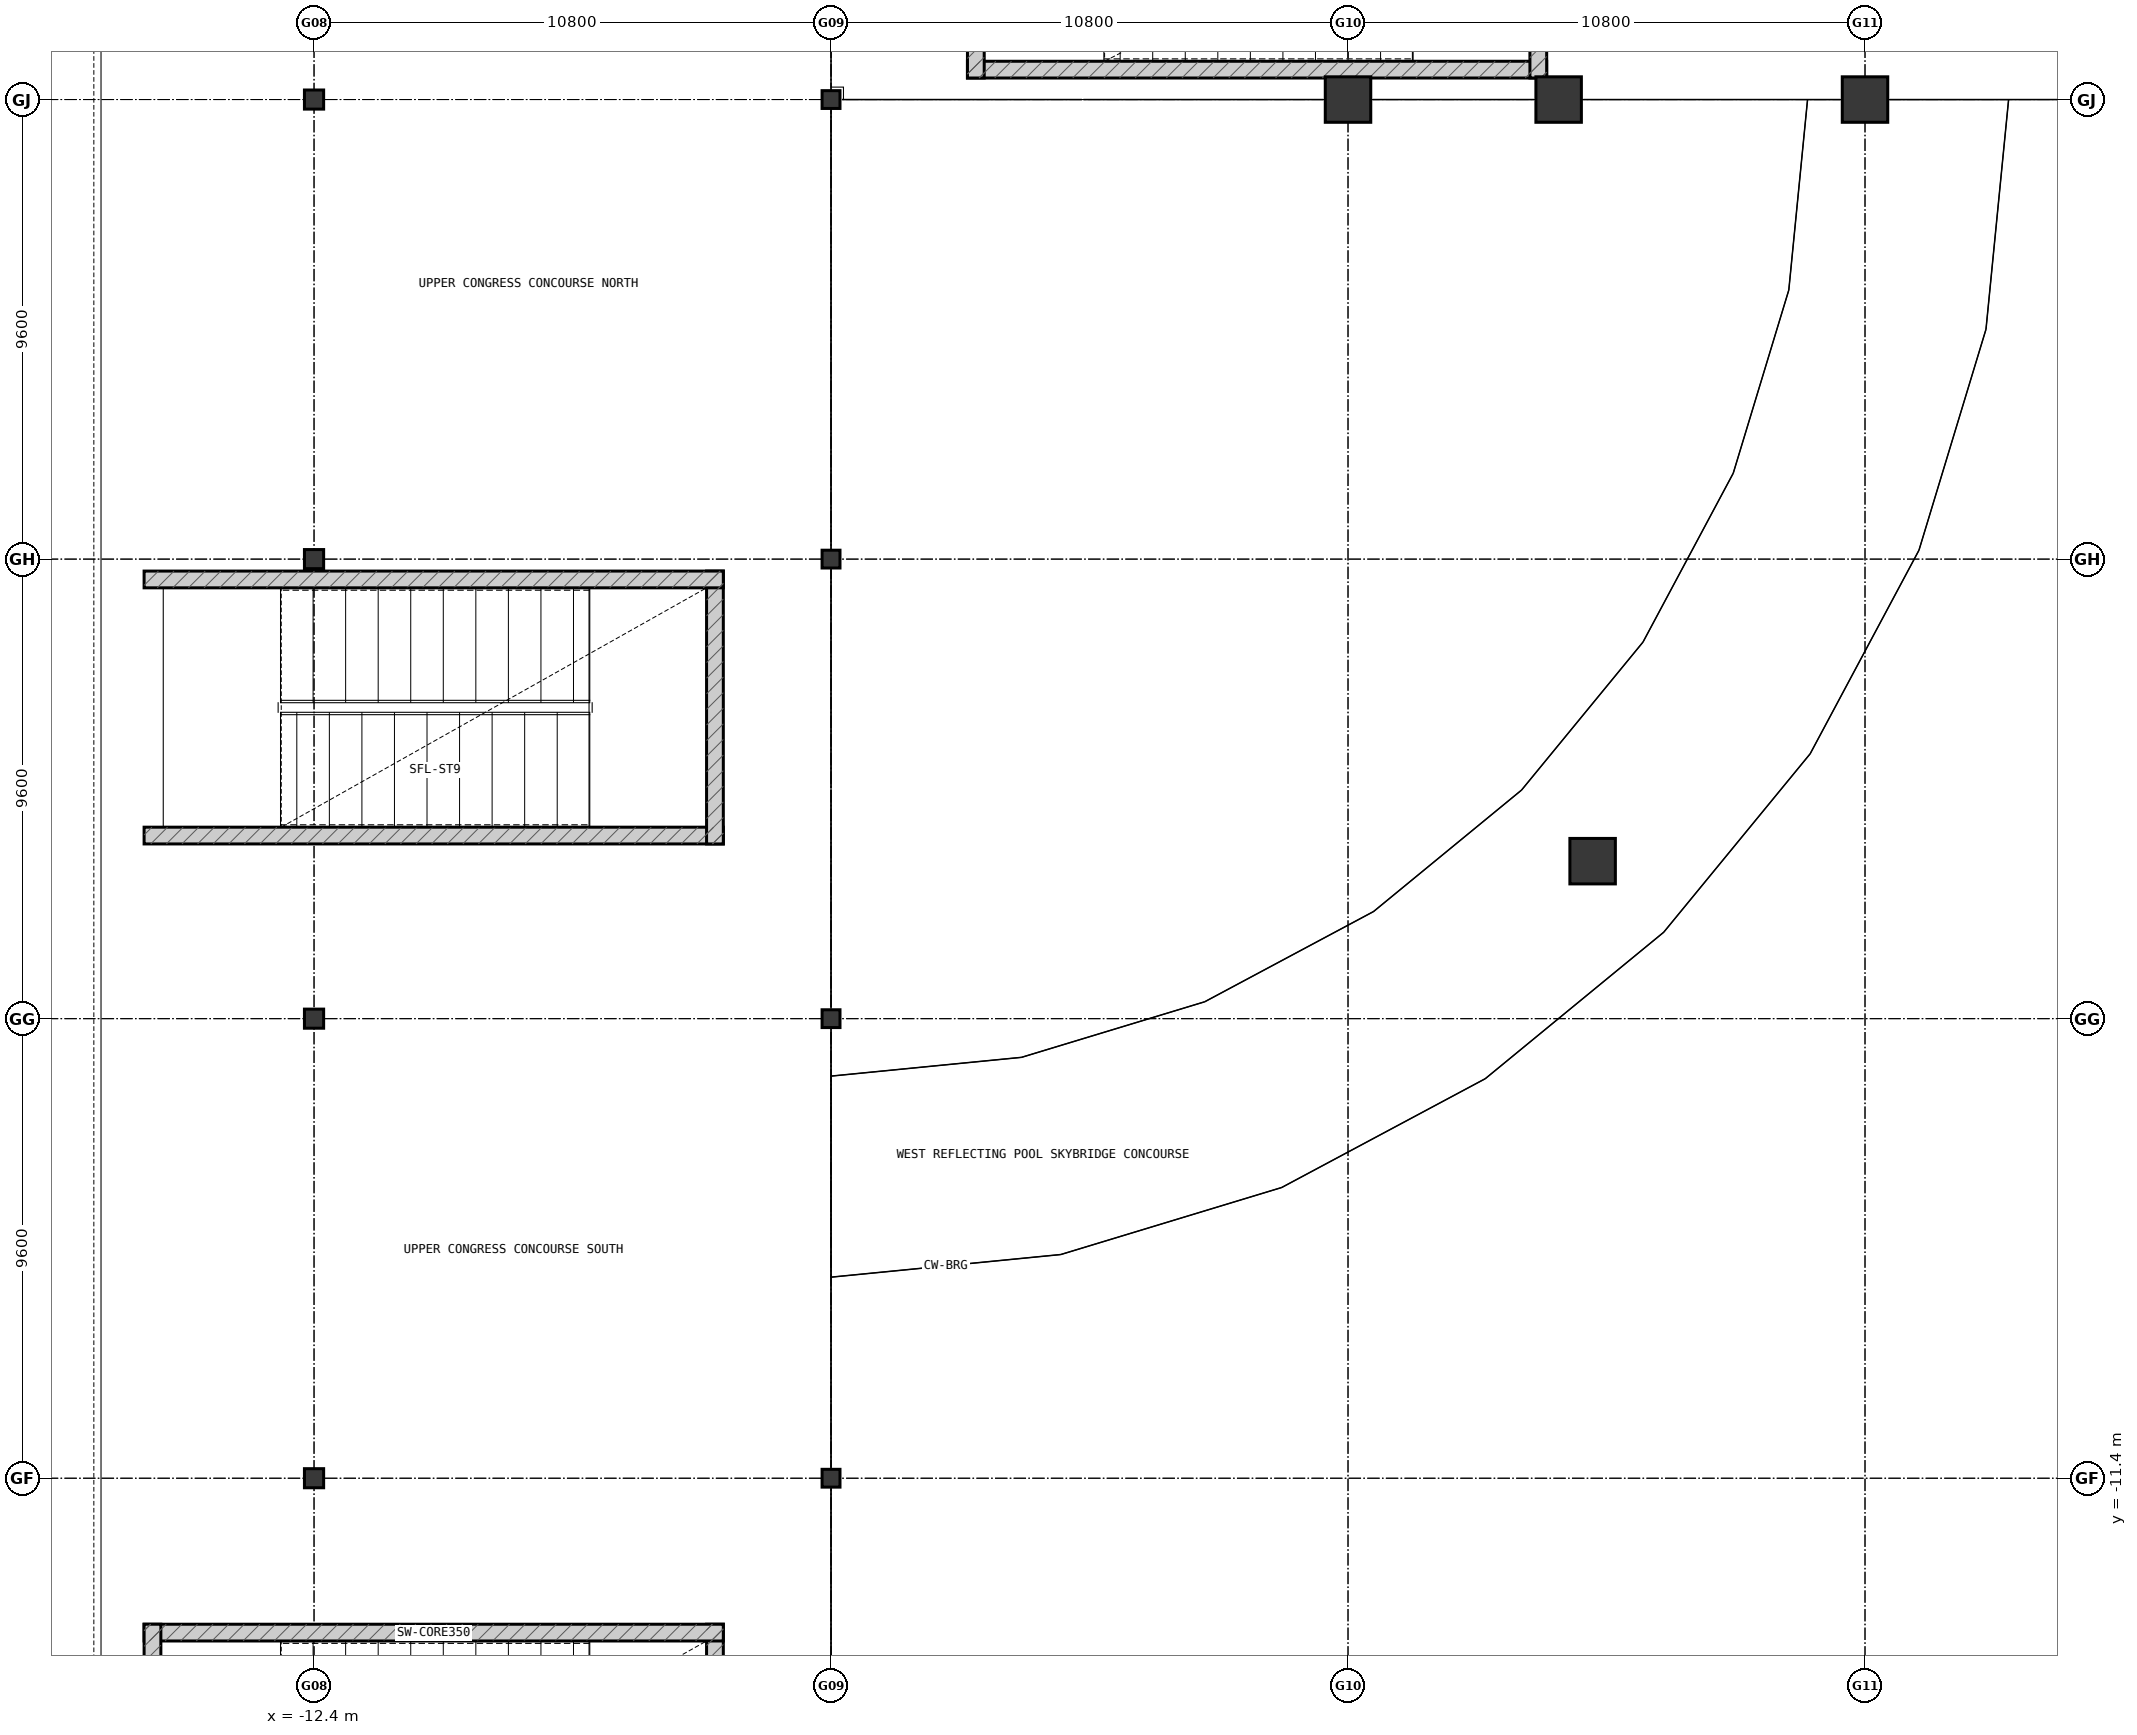
"""IFC4 building model, lengths in metres.
Left out: names, types, materials, properties, quantities, classifications, styles, units other than length and angle.
Written with IfcOpenShell. Run it as: python <this file> out.ifc"""

import sys

from ifc_helpers import new_model, si_unit, direction, frame, frame_2d, origin, origin_2d, place, context, subcontext, project, spatial, rectangle, circle, i_section, extrude, element, save


model = new_model("IFC4")
c1 = context("Model", 3, precision=1e-05, world=origin(), true_north=direction((0.0, 1.0)))
c2 = subcontext(c1, "Body", "Model", "MODEL_VIEW")
j1 = project(units=[si_unit("LENGTHUNIT", "METRE"), si_unit("PLANEANGLEUNIT", "RADIAN")], contexts=[c1])
p1 = place(None, origin())
s1 = spatial("IfcSite", under=j1, at=p1, CompositionType="ELEMENT")
p2 = place(p1, origin())
s2 = spatial("IfcBuilding", under=s1, at=p2, CompositionType="ELEMENT")
p3 = place(p2, frame((0.0, 0.0, 5.4)))
s3 = spatial("IfcBuildingStorey", under=s2, at=p3, CompositionType="ELEMENT", Elevation=5.4)
p4 = place(p3, frame((-12.4, -11.4, 0.0), z_axis=(0.0, 0.0, 1.0), x_axis=(1.0, 0.0, 0.0)))
e1 = element("IfcColumn", 1, at=p4, inside=s3, PredefinedType="COLUMN", context=c2, shape_type="SweptSolid", body=[
    extrude(i_section(OverallWidth=0.401, OverallDepth=0.399, WebThickness=0.025, FlangeThickness=0.04, at=origin_2d()), origin(), (0.0, 0.0, 1.0), 5.4),
])
p5 = place(p3, frame((-1.6, -11.4, 0.0), z_axis=(0.0, 0.0, 1.0), x_axis=(1.0, 0.0, 0.0)))
e2 = element("IfcColumn", 2, at=p5, inside=s3, PredefinedType="COLUMN", context=c2, shape_type="SweptSolid", body=[
    extrude(i_section(OverallWidth=0.374, OverallDepth=0.372, WebThickness=0.016, FlangeThickness=0.026, at=origin_2d()), origin(), (0.0, 0.0, 1.0), 5.4),
])
p6 = place(p3, frame((-12.4, -1.8, 0.0), z_axis=(0.0, 0.0, 1.0), x_axis=(1.0, 0.0, 0.0)))
e3 = element("IfcColumn", 3, at=p6, inside=s3, PredefinedType="COLUMN", context=c2, shape_type="SweptSolid", body=[
    extrude(i_section(OverallWidth=0.401, OverallDepth=0.399, WebThickness=0.025, FlangeThickness=0.04, at=origin_2d()), origin(), (0.0, 0.0, 1.0), 5.4),
])
p7 = place(p3, frame((-1.6, -1.8, 0.0), z_axis=(0.0, 0.0, 1.0), x_axis=(1.0, 0.0, 0.0)))
e4 = element("IfcColumn", 4, at=p7, inside=s3, PredefinedType="COLUMN", context=c2, shape_type="SweptSolid", body=[
    extrude(i_section(OverallWidth=0.374, OverallDepth=0.372, WebThickness=0.016, FlangeThickness=0.026, at=origin_2d()), origin(), (0.0, 0.0, 1.0), 5.4),
])
p8 = place(p3, frame((-12.4, 7.8, 0.0), z_axis=(0.0, 0.0, 1.0), x_axis=(1.0, 0.0, 0.0)))
e5 = element("IfcColumn", 5, at=p8, inside=s3, PredefinedType="COLUMN", context=c2, shape_type="SweptSolid", body=[
    extrude(i_section(OverallWidth=0.401, OverallDepth=0.399, WebThickness=0.025, FlangeThickness=0.04, at=origin_2d()), origin(), (0.0, 0.0, 1.0), 5.4),
])
p9 = place(p3, frame((-1.6, 7.8, 0.0), z_axis=(0.0, 0.0, 1.0), x_axis=(1.0, 0.0, 0.0)))
e6 = element("IfcColumn", 6, at=p9, inside=s3, PredefinedType="COLUMN", context=c2, shape_type="SweptSolid", body=[
    extrude(i_section(OverallWidth=0.374, OverallDepth=0.372, WebThickness=0.016, FlangeThickness=0.026, at=origin_2d()), origin(), (0.0, 0.0, 1.0), 5.4),
])
p10 = place(p3, frame((-12.4, 17.4, 0.0), z_axis=(0.0, 0.0, 1.0), x_axis=(1.0, 0.0, 0.0)))
e7 = element("IfcColumn", 7, at=p10, inside=s3, PredefinedType="COLUMN", context=c2, shape_type="SweptSolid", body=[
    extrude(i_section(OverallWidth=0.401, OverallDepth=0.399, WebThickness=0.025, FlangeThickness=0.04, at=origin_2d()), origin(), (0.0, 0.0, 1.0), 5.4),
])
p11 = place(p3, frame((-1.6, 17.4, 0.0), z_axis=(0.0, 0.0, 1.0), x_axis=(1.0, 0.0, 0.0)))
e8 = element("IfcColumn", 8, at=p11, inside=s3, PredefinedType="COLUMN", context=c2, shape_type="SweptSolid", body=[
    extrude(i_section(OverallWidth=0.374, OverallDepth=0.372, WebThickness=0.016, FlangeThickness=0.026, at=origin_2d()), origin(), (0.0, 0.0, 1.0), 5.4),
])
for number, where, z_axis, x_axis in (
    (9, (9.2, 17.4, 0.0), (0.0, 0.0, 1.0), (1.0, 0.0, 0.0)),
    (10, (13.6, 17.4, 0.0), (0.0, 0.0, 1.0), (1.0, 0.0, 0.0)),
    (11, (20.0, 17.4, 0.0), (0.0, 0.0, 1.0), (1.0, 0.0, 0.0)),
    (12, (14.31, 1.49, 0.0), (0.0, 0.0, 1.0), (1.0, 0.0, 0.0)),
):
    element("IfcColumn", number, at=place(p3, frame(where, z_axis=z_axis, x_axis=x_axis)), inside=s3, PredefinedType="COLUMN", context=c2, shape_type="SweptSolid", body=[
        extrude(circle(Radius=0.475, at=origin_2d()), origin(), (0.0, 0.0, 1.0), 5.4),
    ])
p12 = place(p3, frame((-4.025, -20.15, 0.0), z_axis=(0.0, 0.0, 1.0), x_axis=(0.0, 1.0, 0.0)))
e13 = element("IfcWall", 13, at=p12, inside=s3, PredefinedType="SHEAR", context=c2, shape_type="SweptSolid", body=[
    extrude(rectangle(XDim=5.7, YDim=0.35, at=frame_2d((2.85, 0.0))), origin(), (0.0, 0.0, 1.0), 5.4),
])
p13 = place(p3, frame((-3.85, -14.625, 0.0), z_axis=(0.0, 0.0, 1.0), x_axis=(-1.0, 0.0, 0.0)))
e14 = element("IfcWall", 14, at=p13, inside=s3, PredefinedType="SHEAR", context=c2, shape_type="SweptSolid", body=[
    extrude(rectangle(XDim=12.1, YDim=0.35, at=frame_2d((6.05, 0.0))), origin(), (0.0, 0.0, 1.0), 5.4),
])
p14 = place(p3, frame((-15.775, -14.45, 0.0), z_axis=(0.0, 0.0, 1.0), x_axis=(0.0, -1.0, 0.0)))
e15 = element("IfcWall", 15, at=p14, inside=s3, PredefinedType="SHEAR", context=c2, shape_type="SweptSolid", body=[
    extrude(rectangle(XDim=5.7, YDim=0.35, at=frame_2d((2.85, 0.0))), origin(), (0.0, 0.0, 1.0), 5.4),
])
p15 = place(p14, frame((2.25, 0.0, 0.0)))
e16 = element("IfcOpeningElement", 16, at=p15, cuts=e15, PredefinedType="OPENING", context=c2, shape_type="SweptSolid", body=[
    extrude(rectangle(XDim=1.2, YDim=2.2, at=frame_2d((0.6, 1.1))), frame((0.0, 0.187, 0.0), z_axis=(0.0, -1.0, 0.0), x_axis=(1.0, 0.0, 0.0)), (0.0, 0.0, 1.0), 0.374),
])
p16 = place(p3, frame((1.25, 18.025, 0.0), z_axis=(0.0, 0.0, 1.0), x_axis=(1.0, 0.0, 0.0)))
e17 = element("IfcWall", 17, at=p16, inside=s3, PredefinedType="SHEAR", context=c2, shape_type="SweptSolid", body=[
    extrude(rectangle(XDim=12.1, YDim=0.35, at=frame_2d((6.05, 0.0))), origin(), (0.0, 0.0, 1.0), 5.4),
])
p17 = place(p3, frame((13.175, 17.85, 0.0), z_axis=(0.0, 0.0, 1.0), x_axis=(0.0, 1.0, 0.0)))
e18 = element("IfcWall", 18, at=p17, inside=s3, PredefinedType="SHEAR", context=c2, shape_type="SweptSolid", body=[
    extrude(rectangle(XDim=5.3, YDim=0.35, at=frame_2d((2.65, 0.0))), origin(), (0.0, 0.0, 1.0), 5.4),
])
p18 = place(p3, frame((1.425, 23.15, 0.0), z_axis=(0.0, 0.0, 1.0), x_axis=(0.0, -1.0, 0.0)))
e19 = element("IfcWall", 19, at=p18, inside=s3, PredefinedType="SHEAR", context=c2, shape_type="SweptSolid", body=[
    extrude(rectangle(XDim=5.3, YDim=0.35, at=frame_2d((2.65, 0.0))), origin(), (0.0, 0.0, 1.0), 5.4),
])
p19 = place(p18, frame((2.05, 0.0, 0.0)))
e20 = element("IfcOpeningElement", 20, at=p19, cuts=e19, PredefinedType="OPENING", context=c2, shape_type="SweptSolid", body=[
    extrude(rectangle(XDim=1.2, YDim=2.2, at=frame_2d((0.6, 1.1))), frame((0.0, 0.187, 0.0), z_axis=(0.0, -1.0, 0.0), x_axis=(1.0, 0.0, 0.0)), (0.0, 0.0, 1.0), 0.374),
])
p20 = place(p3, frame((-15.95, 2.025, 0.0), z_axis=(0.0, 0.0, 1.0), x_axis=(1.0, 0.0, 0.0)))
e21 = element("IfcWall", 21, at=p20, inside=s3, PredefinedType="SHEAR", context=c2, shape_type="SweptSolid", body=[
    extrude(rectangle(XDim=12.1, YDim=0.35, at=frame_2d((6.05, 0.0))), origin(), (0.0, 0.0, 1.0), 5.4),
])
p21 = place(p3, frame((-4.025, 1.85, 0.0), z_axis=(0.0, 0.0, 1.0), x_axis=(0.0, 1.0, 0.0)))
e22 = element("IfcWall", 22, at=p21, inside=s3, PredefinedType="SHEAR", context=c2, shape_type="SweptSolid", body=[
    extrude(rectangle(XDim=5.7, YDim=0.35, at=frame_2d((2.85, 0.0))), origin(), (0.0, 0.0, 1.0), 5.4),
])
p22 = place(p3, frame((-3.85, 7.375, 0.0), z_axis=(0.0, 0.0, 1.0), x_axis=(-1.0, 0.0, 0.0)))
e23 = element("IfcWall", 23, at=p22, inside=s3, PredefinedType="SHEAR", context=c2, shape_type="SweptSolid", body=[
    extrude(rectangle(XDim=12.1, YDim=0.35, at=frame_2d((6.05, 0.0))), origin(), (0.0, 0.0, 1.0), 5.4),
])
save(model, sys.argv[1])
